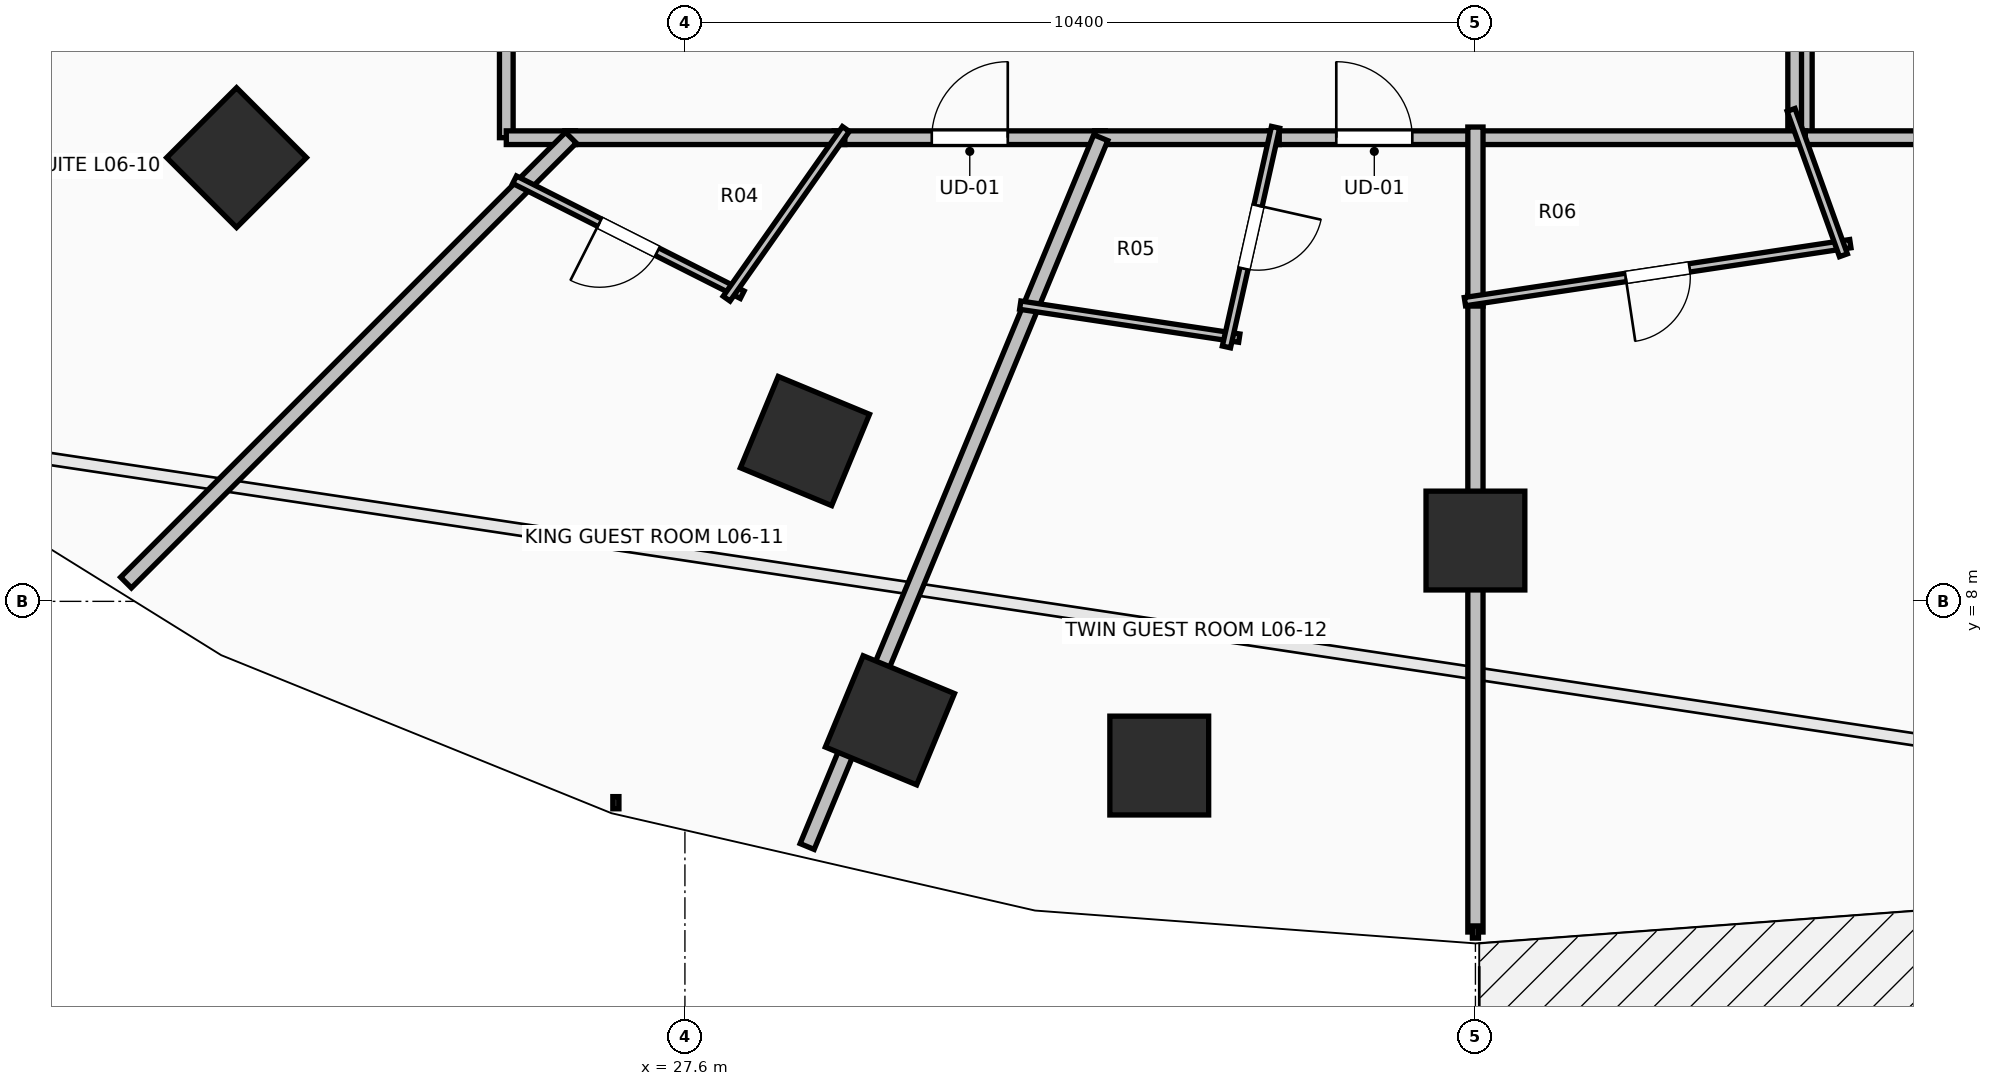
"""IFC4 building model, lengths in metres.
Left out: names, types, materials, properties, quantities, classifications, styles, units other than length and angle.
Written with IfcOpenShell. Run it as: python <this file> out.ifc"""

import sys

from ifc_helpers import new_model, si_unit, direction, frame, frame_2d, origin, origin_2d, place, context, subcontext, project, spatial, rectangle, extrude, element, fill, save


model = new_model("IFC4")
c1 = context("Model", 3, precision=1e-05, world=origin(), true_north=direction((0.0, 1.0)))
c2 = subcontext(c1, "Body", "Model", "MODEL_VIEW")
j1 = project(units=[si_unit("LENGTHUNIT", "METRE"), si_unit("PLANEANGLEUNIT", "RADIAN")], contexts=[c1])
p1 = place(None, origin())
s1 = spatial("IfcSite", under=j1, at=p1, CompositionType="ELEMENT")
p2 = place(p1, origin())
s2 = spatial("IfcBuilding", under=s1, at=p2, CompositionType="ELEMENT")
p3 = place(p2, frame((0.0, 0.0, 27.5)))
s3 = spatial("IfcBuildingStorey", under=s2, at=p3, CompositionType="ELEMENT", Elevation=27.5)
for number, where, z_axis, x_axis in (
    (1, (21.701, 13.838, 0.0), (0.0, 0.0, 1.0), (-0.707, -0.707, 0.0)),
    (2, (29.179, 10.109, 0.0), (0.0, 0.0, 1.0), (-0.383, -0.924, 0.0)),
    (3, (38.0, 8.8, 0.0), (0.0, 0.0, 1.0), (0.0, -1.0, 0.0)),
    (4, (30.297, 6.435, 0.0), (0.0, 0.0, 1.0), (-0.383, -0.924, 0.0)),
    (5, (33.84, 5.84, 0.0), (0.0, 0.0, 1.0), (0.0, -1.0, 0.0)),
):
    element("IfcColumn", number, at=place(p3, frame(where, z_axis=z_axis, x_axis=x_axis)), inside=s3, PredefinedType="COLUMN", context=c2, shape_type="SweptSolid", body=[
        extrude(rectangle(XDim=1.3, YDim=1.3, at=origin_2d()), origin(), (0.0, 0.0, 1.0), 3.5),
    ])
p4 = place(p3, frame((25.25, 17.969, 0.0), z_axis=(0.0, 0.0, 1.0), x_axis=(0.0, -1.0, 0.0)))
e6 = element("IfcWall", 6, at=p4, inside=s3, PredefinedType="PARTITIONING", context=c2, shape_type="SweptSolid", body=[
    extrude(rectangle(XDim=3.869, YDim=0.18, at=frame_2d((1.935, 0.0))), origin(), (0.0, 0.0, 1.0), 2.432),
])
p5 = place(p4, frame((1.409, 0.0, 0.0)))
e7 = element("IfcOpeningElement", 7, at=p5, cuts=e6, PredefinedType="OPENING", context=c2, shape_type="SweptSolid", body=[
    extrude(rectangle(XDim=1.05, YDim=2.2, at=frame_2d((0.525, 1.1))), frame((0.0, 0.105, 0.0), z_axis=(0.0, -1.0, 0.0), x_axis=(1.0, 0.0, 0.0)), (0.0, 0.0, 1.0), 0.21),
])
p6 = place(p3, frame((25.25, 14.1, 0.0), z_axis=(0.0, 0.0, 1.0), x_axis=(1.0, 0.0, 0.0)))
e8 = element("IfcWall", 8, at=p6, inside=s3, PredefinedType="PARTITIONING", context=c2, shape_type="SweptSolid", body=[
    extrude(rectangle(XDim=0.91, YDim=0.18, at=frame_2d((0.455, 0.0))), origin(), (0.0, 0.0, 1.0), 3.24),
])
p7 = place(p3, frame((29.564, 14.1, 0.0), z_axis=(0.0, 0.0, 1.0), x_axis=(1.0, 0.0, 0.0)))
e9 = element("IfcWall", 9, at=p7, inside=s3, PredefinedType="PARTITIONING", context=c2, shape_type="SweptSolid", body=[
    extrude(rectangle(XDim=3.567, YDim=0.18, at=frame_2d((1.784, 0.0))), origin(), (0.0, 0.0, 1.0), 3.24),
])
p8 = place(p7, frame((1.283, 0.0, 0.0)))
e10 = element("IfcOpeningElement", 10, at=p8, cuts=e9, PredefinedType="OPENING", context=c2, shape_type="SweptSolid", body=[
    extrude(rectangle(XDim=1.0, YDim=2.15, at=frame_2d((0.5, 1.075))), frame((0.0, 0.105, 0.0), z_axis=(0.0, -1.0, 0.0), x_axis=(1.0, 0.0, 0.0)), (0.0, 0.0, 1.0), 0.21),
])
p9 = place(p3, frame((26.02, 14.1, 0.0), z_axis=(0.0, 0.0, 1.0), x_axis=(1.0, 0.0, 0.0)))
e11 = element("IfcWall", 11, at=p9, inside=s3, PredefinedType="PARTITIONING", context=c2, shape_type="SweptSolid", body=[
    extrude(rectangle(XDim=3.684, YDim=0.18, at=frame_2d((1.842, 0.0))), origin(), (0.0, 0.0, 1.0), 2.432),
])
p10 = place(p3, frame((35.279, 14.1, 0.0), z_axis=(0.0, 0.0, 1.0), x_axis=(1.0, 0.0, 0.0)))
e12 = element("IfcWall", 12, at=p10, inside=s3, PredefinedType="PARTITIONING", context=c2, shape_type="SweptSolid", body=[
    extrude(rectangle(XDim=2.781, YDim=0.18, at=frame_2d((1.391, 0.0))), origin(), (0.0, 0.0, 1.0), 3.24),
])
p11 = place(p10, frame((0.89, 0.0, 0.0)))
e13 = element("IfcOpeningElement", 13, at=p11, cuts=e12, PredefinedType="OPENING", context=c2, shape_type="SweptSolid", body=[
    extrude(rectangle(XDim=1.0, YDim=2.15, at=frame_2d((0.5, 1.075))), frame((0.0, 0.105, 0.0), z_axis=(0.0, -1.0, 0.0), x_axis=(1.0, 0.0, 0.0)), (0.0, 0.0, 1.0), 0.21),
])
p12 = place(p3, frame((32.991, 14.1, 0.0), z_axis=(0.0, 0.0, 1.0), x_axis=(1.0, 0.0, 0.0)))
e14 = element("IfcWall", 14, at=p12, inside=s3, PredefinedType="PARTITIONING", context=c2, shape_type="SweptSolid", body=[
    extrude(rectangle(XDim=2.428, YDim=0.18, at=frame_2d((1.214, 0.0))), origin(), (0.0, 0.0, 1.0), 3.24),
])
p13 = place(p3, frame((42.34, 16.24, 0.0), z_axis=(0.0, 0.0, 1.0), x_axis=(0.0, -1.0, 0.0)))
e15 = element("IfcWall", 15, at=p13, inside=s3, PredefinedType="PARTITIONING", context=c2, shape_type="SweptSolid", body=[
    extrude(rectangle(XDim=2.14, YDim=0.18, at=frame_2d((1.07, 0.0))), origin(), (0.0, 0.0, 1.0), 3.24),
])
p14 = place(p3, frame((42.34, 14.1, 0.0), z_axis=(0.0, 0.0, 1.0), x_axis=(1.0, 0.0, 0.0)))
e16 = element("IfcWall", 16, at=p14, inside=s3, PredefinedType="PARTITIONING", context=c2, shape_type="SweptSolid", body=[
    extrude(rectangle(XDim=7.645, YDim=0.18, at=frame_2d((3.823, 0.0))), origin(), (0.0, 0.0, 1.0), 2.432),
])
p15 = place(p14, frame((3.298, 0.0, 0.0)))
e17 = element("IfcOpeningElement", 17, at=p15, cuts=e16, PredefinedType="OPENING", context=c2, shape_type="SweptSolid", body=[
    extrude(rectangle(XDim=1.05, YDim=2.2, at=frame_2d((0.525, 1.1))), frame((0.0, 0.105, 0.0), z_axis=(0.0, -1.0, 0.0), x_axis=(1.0, 0.0, 0.0)), (0.0, 0.0, 1.0), 0.21),
])
p16 = place(p3, frame((42.2, 14.157, 0.0), z_axis=(0.0, 0.0, 1.0), x_axis=(0.0, 1.0, 0.0)))
e18 = element("IfcWall", 18, at=p16, inside=s3, PredefinedType="PARTITIONING", context=c2, shape_type="SweptSolid", body=[
    extrude(rectangle(XDim=2.083, YDim=0.18, at=frame_2d((1.042, 0.0))), origin(), (0.0, 0.0, 1.0), 3.24),
])
p17 = place(p3, frame((37.92, 14.1, 0.0), z_axis=(0.0, 0.0, 1.0), x_axis=(1.0, 0.0, 0.0)))
e19 = element("IfcWall", 19, at=p17, inside=s3, PredefinedType="PARTITIONING", context=c2, shape_type="SweptSolid", body=[
    extrude(rectangle(XDim=4.42, YDim=0.18, at=frame_2d((2.21, 0.0))), origin(), (0.0, 0.0, 1.0), 3.24),
])
p18 = place(p3, frame((20.247, 8.247, 0.0), z_axis=(0.0, 0.0, 1.0), x_axis=(0.707106781187, 0.707106781187, 0.0)))
e20 = element("IfcWall", 20, at=p18, inside=s3, PredefinedType="PARTITIONING", context=c2, shape_type="SweptSolid", body=[
    extrude(rectangle(XDim=8.277, YDim=0.2, at=frame_2d((4.139, 0.0))), origin(), (0.0, 0.0, 1.0), 2.624),
])
p19 = place(p3, frame((28.354, 12.034, 0.0), z_axis=(0.0, 0.0, 1.0), x_axis=(-0.892556909034, 0.450934767052, 0.0)))
e21 = element("IfcWall", 21, at=p19, inside=s3, PredefinedType="PARTITIONING", context=c2, shape_type="SweptSolid", body=[
    extrude(rectangle(XDim=3.356, YDim=0.11, at=frame_2d((1.678, 0.0))), origin(), (0.0, 0.0, 1.0), 2.432),
])
p20 = place(p19, frame((1.253, 0.0, 0.0)))
e22 = element("IfcOpeningElement", 22, at=p20, cuts=e21, PredefinedType="OPENING", context=c2, shape_type="SweptSolid", body=[
    extrude(rectangle(XDim=0.85, YDim=2.1, at=frame_2d((0.425, 1.05))), frame((0.0, 0.07, 0.0), z_axis=(0.0, -1.0, 0.0), x_axis=(1.0, 0.0, 0.0)), (0.0, 0.0, 1.0), 0.14),
])
p21 = place(p3, frame((29.718, 14.215, 0.0), z_axis=(0.0, 0.0, 1.0), x_axis=(-0.575076641985, -0.81809953908, 0.0)))
e23 = element("IfcWall", 23, at=p21, inside=s3, PredefinedType="PARTITIONING", context=c2, shape_type="SweptSolid", body=[
    extrude(rectangle(XDim=2.729, YDim=0.11, at=frame_2d((1.364, 0.0))), origin(), (0.0, 0.0, 1.0), 2.432),
])
p22 = place(p3, frame((29.208, 4.775, 0.0), z_axis=(0.0, 0.0, 1.0), x_axis=(0.382718503749, 0.923865004689, 0.0)))
e24 = element("IfcWall", 24, at=p22, inside=s3, PredefinedType="PARTITIONING", context=c2, shape_type="SweptSolid", body=[
    extrude(rectangle(XDim=10.094, YDim=0.2, at=frame_2d((5.047, 0.0))), origin(), (0.0, 0.0, 1.0), 2.432),
])
p23 = place(p3, frame((34.893, 11.463, 0.0), z_axis=(0.0, 0.0, 1.0), x_axis=(-0.988868035357, 0.148795190273, 0.0)))
e25 = element("IfcWall", 25, at=p23, inside=s3, PredefinedType="PARTITIONING", context=c2, shape_type="SweptSolid", body=[
    extrude(rectangle(XDim=2.914, YDim=0.11, at=frame_2d((1.457, 0.0))), origin(), (0.0, 0.0, 1.0), 3.24),
])
p24 = place(p3, frame((35.371, 14.237, 0.0), z_axis=(0.0, 0.0, 1.0), x_axis=(-0.218283637967, -0.975885368983, 0.0)))
e26 = element("IfcWall", 26, at=p24, inside=s3, PredefinedType="PARTITIONING", context=c2, shape_type="SweptSolid", body=[
    extrude(rectangle(XDim=2.96, YDim=0.11, at=frame_2d((1.48, 0.0))), origin(), (0.0, 0.0, 1.0), 2.922),
])
p25 = place(p24, frame((1.055, 0.0, 0.0)))
e27 = element("IfcOpeningElement", 27, at=p25, cuts=e26, PredefinedType="OPENING", context=c2, shape_type="SweptSolid", body=[
    extrude(rectangle(XDim=0.85, YDim=2.1, at=frame_2d((0.425, 1.05))), frame((0.0, 0.07, 0.0), z_axis=(0.0, -1.0, 0.0), x_axis=(1.0, 0.0, 0.0)), (0.0, 0.0, 1.0), 0.14),
])
p26 = place(p3, frame((38.0, 3.65, 0.0), z_axis=(0.0, 0.0, 1.0), x_axis=(0.0, 1.0, 0.0)))
e28 = element("IfcWall", 28, at=p26, inside=s3, PredefinedType="PARTITIONING", context=c2, shape_type="SweptSolid", body=[
    extrude(rectangle(XDim=8.375, YDim=0.2, at=frame_2d((4.188, 0.0))), origin(), (0.0, 0.0, 1.0), 2.432),
])
p27 = place(p3, frame((38.0, 11.885, 0.0), z_axis=(0.0, 0.0, 1.0), x_axis=(0.0, 1.0, 0.0)))
e29 = element("IfcWall", 29, at=p27, inside=s3, PredefinedType="PARTITIONING", context=c2, shape_type="SweptSolid", body=[
    extrude(rectangle(XDim=2.355, YDim=0.2, at=frame_2d((1.177, 0.0))), origin(), (0.0, 0.0, 1.0), 2.922),
])
p28 = place(p3, frame((42.932, 12.706, 0.0), z_axis=(0.0, 0.0, 1.0), x_axis=(-0.988876905643, -0.148736227888, 0.0)))
e30 = element("IfcWall", 30, at=p28, inside=s3, PredefinedType="PARTITIONING", context=c2, shape_type="SweptSolid", body=[
    extrude(rectangle(XDim=5.128, YDim=0.11, at=frame_2d((2.564, 0.0))), origin(), (0.0, 0.0, 1.0), 3.24),
])
p29 = place(p28, frame((2.139, 0.0, 0.0)))
e31 = element("IfcOpeningElement", 31, at=p29, cuts=e30, PredefinedType="OPENING", context=c2, shape_type="SweptSolid", body=[
    extrude(rectangle(XDim=0.85, YDim=2.1, at=frame_2d((0.425, 1.05))), frame((0.0, 0.07, 0.0), z_axis=(0.0, -1.0, 0.0), x_axis=(1.0, 0.0, 0.0)), (0.0, 0.0, 1.0), 0.14),
])
p30 = place(p3, frame((42.153, 14.466, 0.0), z_axis=(0.0, 0.0, 1.0), x_axis=(0.338800270412, -0.940858319179, 0.0)))
e32 = element("IfcWall", 32, at=p30, inside=s3, PredefinedType="PARTITIONING", context=c2, shape_type="SweptSolid", body=[
    extrude(rectangle(XDim=2.033, YDim=0.11, at=frame_2d((1.016, 0.0))), origin(), (0.0, 0.0, 1.0), 2.432),
])
p31 = place(p8, origin())
e33 = element("IfcDoor", 33, at=p31, inside=s3, OperationType="SINGLE_SWING_RIGHT", PredefinedType="DOOR", context=c2, shape_type="SweptSolid", body=[
    extrude(rectangle(XDim=1.0, YDim=2.15, at=frame_2d((0.5, 1.075))), frame((0.0, 0.025, 0.0), z_axis=(0.0, -1.0, 0.0), x_axis=(1.0, 0.0, 0.0)), (0.0, 0.0, 1.0), 0.05),
])
fill(e10, e33)
p32 = place(p11, origin())
e34 = element("IfcDoor", 34, at=p32, inside=s3, OperationType="SINGLE_SWING_LEFT", PredefinedType="DOOR", context=c2, shape_type="SweptSolid", body=[
    extrude(rectangle(XDim=1.0, YDim=2.15, at=frame_2d((0.5, 1.075))), frame((0.0, 0.025, 0.0), z_axis=(0.0, -1.0, 0.0), x_axis=(1.0, 0.0, 0.0)), (0.0, 0.0, 1.0), 0.05),
])
fill(e13, e34)
p33 = place(p20, origin())
e35 = element("IfcDoor", 35, at=p33, inside=s3, OperationType="SINGLE_SWING_RIGHT", PredefinedType="DOOR", context=c2, shape_type="SweptSolid", body=[
    extrude(rectangle(XDim=0.85, YDim=2.1, at=frame_2d((0.425, 1.05))), frame((0.0, 0.025, 0.0), z_axis=(0.0, -1.0, 0.0), x_axis=(1.0, 0.0, 0.0)), (0.0, 0.0, 1.0), 0.05),
])
fill(e22, e35)
p34 = place(p25, origin())
e36 = element("IfcDoor", 36, at=p34, inside=s3, OperationType="SINGLE_SWING_LEFT", PredefinedType="DOOR", context=c2, shape_type="SweptSolid", body=[
    extrude(rectangle(XDim=0.85, YDim=2.1, at=frame_2d((0.425, 1.05))), frame((0.0, 0.025, 0.0), z_axis=(0.0, -1.0, 0.0), x_axis=(1.0, 0.0, 0.0)), (0.0, 0.0, 1.0), 0.05),
])
fill(e27, e36)
p35 = place(p29, origin())
e37 = element("IfcDoor", 37, at=p35, inside=s3, OperationType="SINGLE_SWING_RIGHT", PredefinedType="DOOR", context=c2, shape_type="SweptSolid", body=[
    extrude(rectangle(XDim=0.85, YDim=2.1, at=frame_2d((0.425, 1.05))), frame((0.0, 0.025, 0.0), z_axis=(0.0, -1.0, 0.0), x_axis=(1.0, 0.0, 0.0)), (0.0, 0.0, 1.0), 0.05),
])
fill(e31, e37)
save(model, sys.argv[1])
